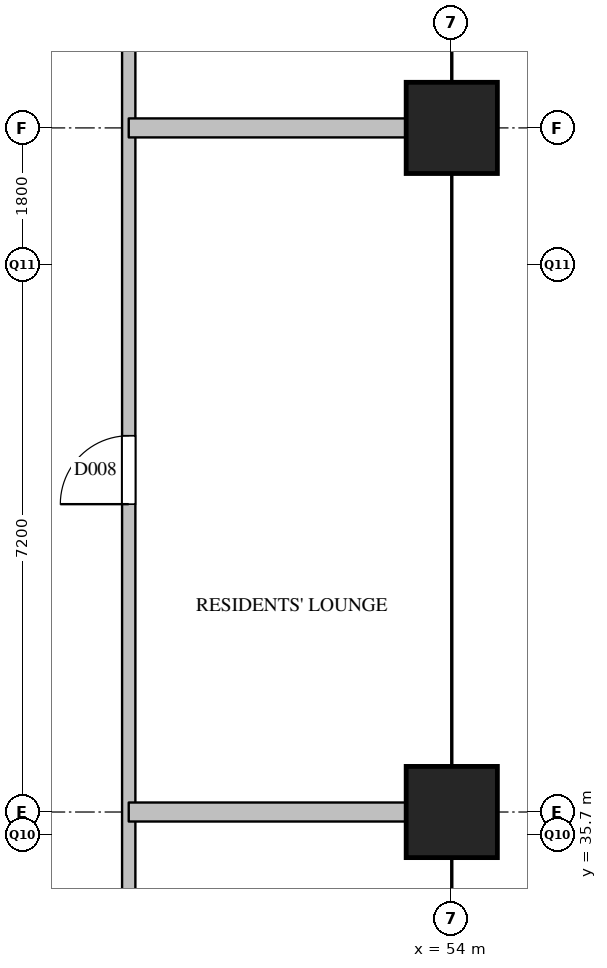
"""IFC4 building model, lengths in metres.
Left out: names, types, materials, properties, quantities, classifications, styles, units other than length and angle.
Written with IfcOpenShell. Run it as: python <this file> out.ifc"""

import sys

from ifc_helpers import new_model, si_unit, direction, frame, frame_2d, origin, origin_2d, place, context, subcontext, project, spatial, rectangle, extrude, element, fill, save


model = new_model("IFC4")
c1 = context("Model", 3, precision=1e-05, world=origin(), true_north=direction((0.0, 1.0)))
c2 = subcontext(c1, "Body", "Model", "MODEL_VIEW")
j1 = project(units=[si_unit("LENGTHUNIT", "METRE"), si_unit("PLANEANGLEUNIT", "RADIAN")], contexts=[c1])
p1 = place(None, origin())
s1 = spatial("IfcSite", under=j1, at=p1, CompositionType="ELEMENT")
p2 = place(p1, origin())
s2 = spatial("IfcBuilding", under=s1, at=p2, CompositionType="ELEMENT")
p3 = place(p2, frame((0.0, 0.0, 226.7)))
s3 = spatial("IfcBuildingStorey", under=s2, at=p3, CompositionType="ELEMENT", Elevation=226.7)
for number, where, z_axis, x_axis in (
    (1, (54.0, 36.0, 0.0), (0.0, 0.0, 1.0), (1.0, 0.0, 0.0)),
    (2, (54.0, 45.0, 0.0), (0.0, 0.0, 1.0), (1.0, 0.0, 0.0)),
):
    element("IfcColumn", number, at=place(p3, frame(where, z_axis=z_axis, x_axis=x_axis)), inside=s3, PredefinedType="COLUMN", context=c2, shape_type="SweptSolid", body=[
        extrude(rectangle(XDim=1.2, YDim=1.2, at=origin_2d()), origin(), (0.0, 0.0, 1.0), 3.9),
    ])
p4 = place(p3, frame((49.75, 28.5, 0.0), z_axis=(0.0, 0.0, 1.0), x_axis=(0.0, 1.0, 0.0)))
e3 = element("IfcWall", 3, at=p4, inside=s3, PredefinedType="PARTITIONING", context=c2, shape_type="SweptSolid", body=[
    extrude(rectangle(XDim=22.85, YDim=0.175, at=frame_2d((11.425, 0.0))), origin(), (0.0, 0.0, 1.0), 3.5),
])
p5 = place(p4, frame((3.3, 0.0, 0.0)))
e4 = element("IfcOpeningElement", 4, at=p5, cuts=e3, PredefinedType="OPENING", context=c2, shape_type="SweptSolid", body=[
    extrude(rectangle(XDim=0.9, YDim=2.1, at=frame_2d((0.45, 1.05))), frame((0.0, 0.097, 0.0), z_axis=(0.0, -1.0, 0.0), x_axis=(1.0, 0.0, 0.0)), (0.0, 0.0, 1.0), 0.195),
])
p6 = place(p4, frame((11.55, 0.0, 0.0)))
e5 = element("IfcOpeningElement", 5, at=p6, cuts=e3, PredefinedType="OPENING", context=c2, shape_type="SweptSolid", body=[
    extrude(rectangle(XDim=0.9, YDim=2.1, at=frame_2d((0.45, 1.05))), frame((0.0, 0.097, 0.0), z_axis=(0.0, -1.0, 0.0), x_axis=(1.0, 0.0, 0.0)), (0.0, 0.0, 1.0), 0.195),
])
p7 = place(p4, frame((19.225, 0.0, 0.0)))
e6 = element("IfcOpeningElement", 6, at=p7, cuts=e3, PredefinedType="OPENING", context=c2, shape_type="SweptSolid", body=[
    extrude(rectangle(XDim=0.9, YDim=2.1, at=frame_2d((0.45, 1.05))), frame((0.0, 0.097, 0.0), z_axis=(0.0, -1.0, 0.0), x_axis=(1.0, 0.0, 0.0)), (0.0, 0.0, 1.0), 0.195),
])
for number, where, z_axis, x_axis in (
    (7, (49.75, 36.0, 0.0), (0.0, 0.0, 1.0), (1.0, 0.0, 0.0)),
    (8, (49.75, 45.0, 0.0), (0.0, 0.0, 1.0), (1.0, 0.0, 0.0)),
):
    element("IfcWall", number, at=place(p3, frame(where, z_axis=z_axis, x_axis=x_axis)), inside=s3, PredefinedType="PARTITIONING", context=c2, shape_type="SweptSolid", body=[
        extrude(rectangle(XDim=4.25, YDim=0.25, at=frame_2d((2.125, 0.0))), origin(), (0.0, 0.0, 1.0), 3.5),
    ])
p8 = place(p6, origin())
e9 = element("IfcDoor", 9, at=p8, inside=s3, OperationType="SINGLE_SWING_LEFT", PredefinedType="DOOR", context=c2, shape_type="SweptSolid", body=[
    extrude(rectangle(XDim=0.9, YDim=2.1, at=frame_2d((0.45, 1.05))), frame((0.0, 0.025, 0.0), z_axis=(0.0, -1.0, 0.0), x_axis=(1.0, 0.0, 0.0)), (0.0, 0.0, 1.0), 0.05),
])
fill(e5, e9)
save(model, sys.argv[1])
